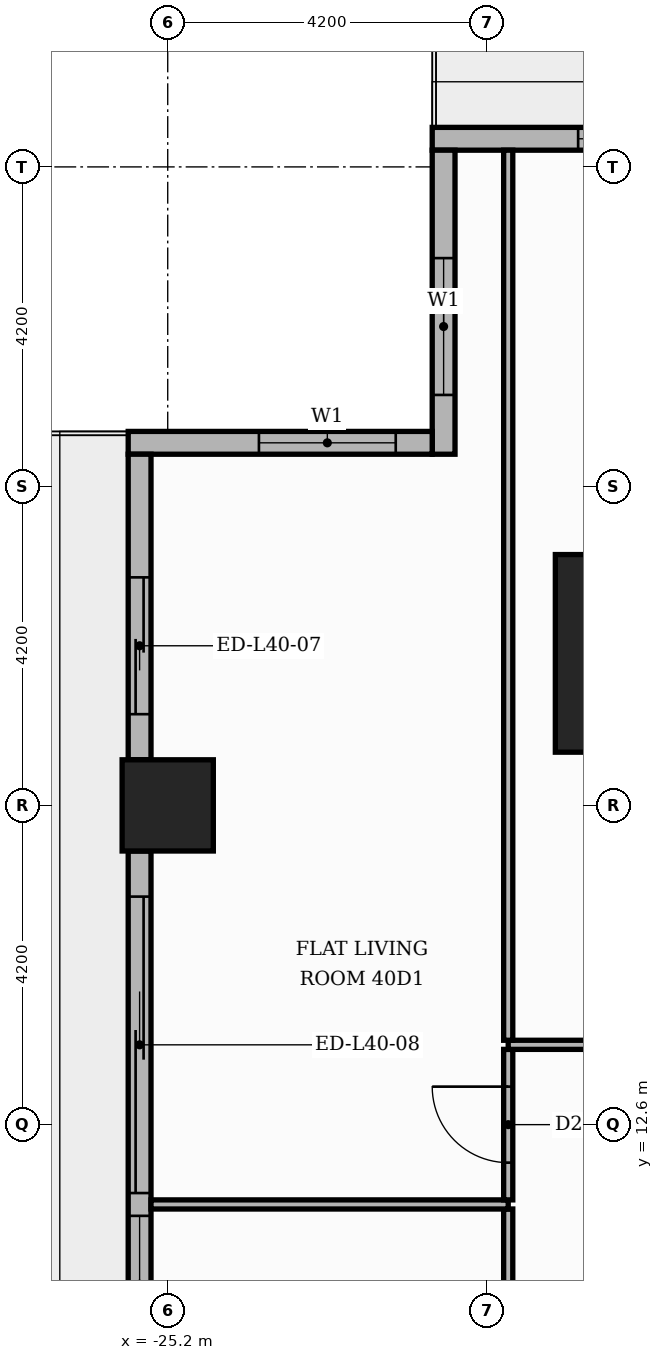
"""IFC4 building model, lengths in metres.
Left out: names, types, materials, properties, quantities, classifications, styles, units other than length and angle.
Written with IfcOpenShell. Run it as: python <this file> out.ifc"""

import sys

from ifc_helpers import new_model, si_unit, direction, frame, frame_2d, origin, origin_2d, place, context, subcontext, project, spatial, rectangle, extrude, element, fill, save


model = new_model("IFC4")
c1 = context("Model", 3, precision=1e-05, world=origin(), true_north=direction((0.0, 1.0)))
c2 = subcontext(c1, "Body", "Model", "MODEL_VIEW")
j1 = project(units=[si_unit("LENGTHUNIT", "METRE"), si_unit("PLANEANGLEUNIT", "RADIAN")], contexts=[c1])
p1 = place(None, origin())
s1 = spatial("IfcSite", under=j1, at=p1, CompositionType="ELEMENT")
p2 = place(p1, origin())
s2 = spatial("IfcBuilding", under=s1, at=p2, CompositionType="ELEMENT")
p3 = place(p2, frame((0.0, 0.0, 168.9)))
s3 = spatial("IfcBuildingStorey", under=s2, at=p3, CompositionType="ELEMENT", Elevation=168.9)
p4 = place(p3, frame((-18.8, 18.8, 0.0), z_axis=(0.0, 0.0, 1.0), x_axis=(1.0, 0.0, 0.0)))
e1 = element("IfcColumn", 1, at=p4, inside=s3, PredefinedType="COLUMN", context=c2, shape_type="SweptSolid", body=[
    extrude(rectangle(XDim=2.6, YDim=2.6, at=origin_2d()), origin(), (0.0, 0.0, 1.0), 3.9),
])
p5 = place(p3, frame((-25.2, 16.8, 0.0), z_axis=(0.0, 0.0, 1.0), x_axis=(1.0, 0.0, 0.0)))
e2 = element("IfcColumn", 2, at=p5, inside=s3, PredefinedType="COLUMN", context=c2, shape_type="SweptSolid", body=[
    extrude(rectangle(XDim=1.2, YDim=1.2, at=origin_2d()), origin(), (0.0, 0.0, 1.0), 3.9),
])
p6 = place(p3, frame((-17.4, 25.57, 0.0), z_axis=(0.0, 0.0, 1.0), x_axis=(-1.0, 0.0, 0.0)))
e3 = element("IfcWall", 3, at=p6, inside=s3, PredefinedType="STANDARD", context=c2, shape_type="SweptSolid", body=[
    extrude(rectangle(XDim=4.32, YDim=0.3, at=frame_2d((2.16, 0.0))), origin(), (0.0, 0.0, 1.0), 3.48),
])
p7 = place(p6, frame((0.6, 0.0, 0.9)))
e4 = element("IfcOpeningElement", 4, at=p7, cuts=e3, PredefinedType="OPENING", context=c2, shape_type="SweptSolid", body=[
    extrude(rectangle(XDim=1.8, YDim=2.1, at=frame_2d((0.9, 1.05))), frame((0.0, 0.16, 0.0), z_axis=(0.0, -1.0, 0.0), x_axis=(1.0, 0.0, 0.0)), (0.0, 0.0, 1.0), 0.32),
])
p8 = place(p3, frame((-21.57, 25.42, 0.0), z_axis=(0.0, 0.0, 1.0), x_axis=(0.0, -1.0, 0.0)))
e5 = element("IfcWall", 5, at=p8, inside=s3, PredefinedType="STANDARD", context=c2, shape_type="SweptSolid", body=[
    extrude(rectangle(XDim=4.0, YDim=0.3, at=frame_2d((2.0, 0.0))), origin(), (0.0, 0.0, 1.0), 3.48),
])
p9 = place(p8, frame((1.42, 0.0, 0.9)))
e6 = element("IfcOpeningElement", 6, at=p9, cuts=e5, PredefinedType="OPENING", context=c2, shape_type="SweptSolid", body=[
    extrude(rectangle(XDim=1.8, YDim=2.1, at=frame_2d((0.9, 1.05))), frame((0.0, 0.16, 0.0), z_axis=(0.0, -1.0, 0.0), x_axis=(1.0, 0.0, 0.0)), (0.0, 0.0, 1.0), 0.32),
])
p10 = place(p3, frame((-21.72, 21.57, 0.0), z_axis=(0.0, 0.0, 1.0), x_axis=(-1.0, 0.0, 0.0)))
e7 = element("IfcWall", 7, at=p10, inside=s3, PredefinedType="STANDARD", context=c2, shape_type="SweptSolid", body=[
    extrude(rectangle(XDim=4.0, YDim=0.3, at=frame_2d((2.0, 0.0))), origin(), (0.0, 0.0, 1.0), 3.48),
])
p11 = place(p10, frame((0.48, 0.0, 0.9)))
e8 = element("IfcOpeningElement", 8, at=p11, cuts=e7, PredefinedType="OPENING", context=c2, shape_type="SweptSolid", body=[
    extrude(rectangle(XDim=1.8, YDim=2.1, at=frame_2d((0.9, 1.05))), frame((0.0, 0.16, 0.0), z_axis=(0.0, -1.0, 0.0), x_axis=(1.0, 0.0, 0.0)), (0.0, 0.0, 1.0), 0.32),
])
p12 = place(p3, frame((-25.57, 21.42, 0.0), z_axis=(0.0, 0.0, 1.0), x_axis=(0.0, -1.0, 0.0)))
e9 = element("IfcWall", 9, at=p12, inside=s3, PredefinedType="STANDARD", context=c2, shape_type="SweptSolid", body=[
    extrude(rectangle(XDim=4.02, YDim=0.3, at=frame_2d((2.01, 0.0))), origin(), (0.0, 0.0, 1.0), 3.48),
])
p13 = place(p12, frame((1.62, 0.0, 0.0)))
e10 = element("IfcOpeningElement", 10, at=p13, cuts=e9, PredefinedType="OPENING", context=c2, shape_type="SweptSolid", body=[
    extrude(rectangle(XDim=1.8, YDim=2.4, at=frame_2d((0.9, 1.2))), frame((0.0, 0.16, 0.0), z_axis=(0.0, -1.0, 0.0), x_axis=(1.0, 0.0, 0.0)), (0.0, 0.0, 1.0), 0.32),
])
p14 = place(p3, frame((-25.57, 16.2, 0.0), z_axis=(0.0, 0.0, 1.0), x_axis=(0.0, -1.0, 0.0)))
e11 = element("IfcWall", 11, at=p14, inside=s3, PredefinedType="STANDARD", context=c2, shape_type="SweptSolid", body=[
    extrude(rectangle(XDim=7.2, YDim=0.3, at=frame_2d((3.6, 0.0))), origin(), (0.0, 0.0, 1.0), 3.48),
])
p15 = place(p14, frame((0.6, 0.0, 0.0)))
e12 = element("IfcOpeningElement", 12, at=p15, cuts=e11, PredefinedType="OPENING", context=c2, shape_type="SweptSolid", body=[
    extrude(rectangle(XDim=3.9, YDim=2.4, at=frame_2d((1.95, 1.2))), frame((0.0, 0.16, 0.0), z_axis=(0.0, -1.0, 0.0), x_axis=(1.0, 0.0, 0.0)), (0.0, 0.0, 1.0), 0.32),
])
p16 = place(p14, frame((4.8, 0.0, 0.9)))
e13 = element("IfcOpeningElement", 13, at=p16, cuts=e11, PredefinedType="OPENING", context=c2, shape_type="SweptSolid", body=[
    extrude(rectangle(XDim=1.8, YDim=2.1, at=frame_2d((0.9, 1.05))), frame((0.0, 0.16, 0.0), z_axis=(0.0, -1.0, 0.0), x_axis=(1.0, 0.0, 0.0)), (0.0, 0.0, 1.0), 0.32),
])
p17 = place(p3, frame((-20.72, 7.41, 0.0), z_axis=(0.0, 0.0, 1.0), x_axis=(0.0, 1.0, 0.0)))
e14 = element("IfcWall", 14, at=p17, inside=s3, PredefinedType="PARTITIONING", context=c2, shape_type="SweptSolid", body=[
    extrude(rectangle(XDim=4.08, YDim=0.12, at=frame_2d((2.04, 0.0))), origin(), (0.0, 0.0, 1.0), 3.48),
])
p18 = place(p17, frame((1.59, 0.0, 0.0)))
e15 = element("IfcOpeningElement", 15, at=p18, cuts=e14, PredefinedType="OPENING", context=c2, shape_type="SweptSolid", body=[
    extrude(rectangle(XDim=0.9, YDim=2.1, at=frame_2d((0.45, 1.05))), frame((0.0, 0.07, 0.0), z_axis=(0.0, -1.0, 0.0), x_axis=(1.0, 0.0, 0.0)), (0.0, 0.0, 1.0), 0.14),
])
p19 = place(p3, frame((-25.42, 11.55, 0.0), z_axis=(0.0, 0.0, 1.0), x_axis=(1.0, 0.0, 0.0)))
e16 = element("IfcWall", 16, at=p19, inside=s3, PredefinedType="PARTITIONING", context=c2, shape_type="SweptSolid", body=[
    extrude(rectangle(XDim=4.7, YDim=0.12, at=frame_2d((2.35, 0.0))), origin(), (0.0, 0.0, 1.0), 3.48),
])
p20 = place(p3, frame((-20.72, 11.61, 0.0), z_axis=(0.0, 0.0, 1.0), x_axis=(0.0, 1.0, 0.0)))
e17 = element("IfcWall", 17, at=p20, inside=s3, PredefinedType="PARTITIONING", context=c2, shape_type="SweptSolid", body=[
    extrude(rectangle(XDim=1.98, YDim=0.12, at=frame_2d((0.99, 0.0))), origin(), (0.0, 0.0, 1.0), 3.48),
])
p21 = place(p20, frame((0.49, 0.0, 0.0)))
e18 = element("IfcOpeningElement", 18, at=p21, cuts=e17, PredefinedType="OPENING", context=c2, shape_type="SweptSolid", body=[
    extrude(rectangle(XDim=1.0, YDim=2.1, at=frame_2d((0.5, 1.05))), frame((0.0, 0.07, 0.0), z_axis=(0.0, -1.0, 0.0), x_axis=(1.0, 0.0, 0.0)), (0.0, 0.0, 1.0), 0.14),
])
p22 = place(p3, frame((-20.72, 13.65, 0.0), z_axis=(0.0, 0.0, 1.0), x_axis=(1.0, 0.0, 0.0)))
e19 = element("IfcWall", 19, at=p22, inside=s3, PredefinedType="PARTITIONING", context=c2, shape_type="SweptSolid", body=[
    extrude(rectangle(XDim=7.07, YDim=0.12, at=frame_2d((3.535, 0.0))), origin(), (0.0, 0.0, 1.0), 3.48),
])
p23 = place(p22, frame((3.085, 0.0, 0.0)))
e20 = element("IfcOpeningElement", 20, at=p23, cuts=e19, PredefinedType="OPENING", context=c2, shape_type="SweptSolid", body=[
    extrude(rectangle(XDim=0.9, YDim=2.1, at=frame_2d((0.45, 1.05))), frame((0.0, 0.07, 0.0), z_axis=(0.0, -1.0, 0.0), x_axis=(1.0, 0.0, 0.0)), (0.0, 0.0, 1.0), 0.14),
])
p24 = place(p3, frame((-20.72, 13.71, 0.0), z_axis=(0.0, 0.0, 1.0), x_axis=(0.0, 1.0, 0.0)))
e21 = element("IfcWall", 21, at=p24, inside=s3, PredefinedType="PARTITIONING", context=c2, shape_type="SweptSolid", body=[
    extrude(rectangle(XDim=11.71, YDim=0.12, at=frame_2d((5.855, 0.0))), origin(), (0.0, 0.0, 1.0), 3.48),
])
p25 = place(p7, origin())
e22 = element("IfcWindow", 22, at=p25, inside=s3, PartitioningType="SINGLE_PANEL", PredefinedType="WINDOW", context=c2, shape_type="SweptSolid", body=[
    extrude(rectangle(XDim=1.8, YDim=2.1, at=frame_2d((0.9, 1.05))), frame((0.0, 0.03, 0.0), z_axis=(0.0, -1.0, 0.0), x_axis=(1.0, 0.0, 0.0)), (0.0, 0.0, 1.0), 0.06),
])
fill(e4, e22)
p26 = place(p9, origin())
e23 = element("IfcWindow", 23, at=p26, inside=s3, PartitioningType="SINGLE_PANEL", PredefinedType="WINDOW", context=c2, shape_type="SweptSolid", body=[
    extrude(rectangle(XDim=1.8, YDim=2.1, at=frame_2d((0.9, 1.05))), frame((0.0, 0.03, 0.0), z_axis=(0.0, -1.0, 0.0), x_axis=(1.0, 0.0, 0.0)), (0.0, 0.0, 1.0), 0.06),
])
fill(e6, e23)
p27 = place(p11, origin())
e24 = element("IfcWindow", 24, at=p27, inside=s3, PartitioningType="SINGLE_PANEL", PredefinedType="WINDOW", context=c2, shape_type="SweptSolid", body=[
    extrude(rectangle(XDim=1.8, YDim=2.1, at=frame_2d((0.9, 1.05))), frame((0.0, 0.03, 0.0), z_axis=(0.0, -1.0, 0.0), x_axis=(1.0, 0.0, 0.0)), (0.0, 0.0, 1.0), 0.06),
])
fill(e8, e24)
p28 = place(p13, origin())
e25 = element("IfcDoor", 25, at=p28, inside=s3, OperationType="SLIDING_TO_RIGHT", PredefinedType="DOOR", context=c2, shape_type="SweptSolid", body=[
    extrude(rectangle(XDim=1.8, YDim=2.4, at=frame_2d((0.9, 1.2))), frame((0.0, 0.025, 0.0), z_axis=(0.0, -1.0, 0.0), x_axis=(1.0, 0.0, 0.0)), (0.0, 0.0, 1.0), 0.05),
])
fill(e10, e25)
p29 = place(p15, origin())
e26 = element("IfcDoor", 26, at=p29, inside=s3, OperationType="SLIDING_TO_LEFT", PredefinedType="DOOR", context=c2, shape_type="SweptSolid", body=[
    extrude(rectangle(XDim=3.9, YDim=2.4, at=frame_2d((1.95, 1.2))), frame((0.0, 0.025, 0.0), z_axis=(0.0, -1.0, 0.0), x_axis=(1.0, 0.0, 0.0)), (0.0, 0.0, 1.0), 0.05),
])
fill(e12, e26)
p30 = place(p16, origin())
e27 = element("IfcWindow", 27, at=p30, inside=s3, PartitioningType="SINGLE_PANEL", PredefinedType="WINDOW", context=c2, shape_type="SweptSolid", body=[
    extrude(rectangle(XDim=1.8, YDim=2.1, at=frame_2d((0.9, 1.05))), frame((0.0, 0.03, 0.0), z_axis=(0.0, -1.0, 0.0), x_axis=(1.0, 0.0, 0.0)), (0.0, 0.0, 1.0), 0.06),
])
fill(e13, e27)
p31 = place(p21, origin())
e28 = element("IfcDoor", 28, at=p31, inside=s3, OperationType="SINGLE_SWING_RIGHT", PredefinedType="DOOR", context=c2, shape_type="SweptSolid", body=[
    extrude(rectangle(XDim=1.0, YDim=2.1, at=frame_2d((0.5, 1.05))), frame((0.0, 0.025, 0.0), z_axis=(0.0, -1.0, 0.0), x_axis=(1.0, 0.0, 0.0)), (0.0, 0.0, 1.0), 0.05),
])
fill(e18, e28)
save(model, sys.argv[1])
